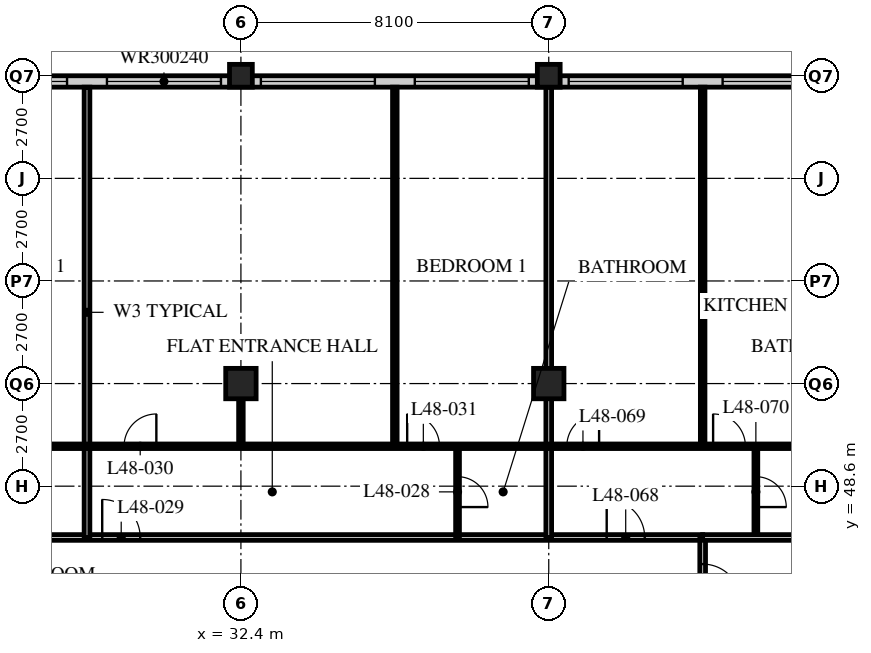
"""IFC4 building model, lengths in metres.
Left out: names, types, materials, properties, quantities, classifications, styles, units other than length and angle.
Written with IfcOpenShell. Run it as: python <this file> out.ifc"""

import sys

from ifc_helpers import new_model, si_unit, direction, frame, frame_2d, origin, origin_2d, place, context, subcontext, project, spatial, rectangle, hollow_rectangle, extrude, element, fill, save


model = new_model("IFC4")
c1 = context("Model", 3, precision=1e-05, world=origin(), true_north=direction((0.0, 1.0)))
c2 = subcontext(c1, "Body", "Model", "MODEL_VIEW")
j1 = project(units=[si_unit("LENGTHUNIT", "METRE"), si_unit("PLANEANGLEUNIT", "RADIAN")], contexts=[c1])
p1 = place(None, origin())
s1 = spatial("IfcSite", under=j1, at=p1, CompositionType="ELEMENT")
p2 = place(p1, origin())
s2 = spatial("IfcBuilding", under=s1, at=p2, CompositionType="ELEMENT")
p3 = place(p2, frame((0.0, 0.0, 188.4)))
s3 = spatial("IfcBuildingStorey", under=s2, at=p3, CompositionType="ELEMENT", Elevation=188.4)
p4 = place(p3, frame((32.4, 51.3, 0.0), z_axis=(0.0, 0.0, 1.0), x_axis=(1.0, 0.0, 0.0)))
e1 = element("IfcColumn", 1, at=p4, inside=s3, PredefinedType="COLUMN", context=c2, shape_type="SweptSolid", body=[
    extrude(hollow_rectangle(XDim=0.8, YDim=0.8, WallThickness=0.08, at=origin_2d()), origin(), (0.0, 0.0, 1.0), 3.6),
])
p5 = place(p3, frame((32.4, 59.4, 0.0), z_axis=(0.0, 0.0, 1.0), x_axis=(1.0, 0.0, 0.0)))
e2 = element("IfcColumn", 2, at=p5, inside=s3, PredefinedType="COLUMN", context=c2, shape_type="SweptSolid", body=[
    extrude(hollow_rectangle(XDim=0.6, YDim=0.6, WallThickness=0.05, at=origin_2d()), origin(), (0.0, 0.0, 1.0), 3.6),
])
p6 = place(p3, frame((40.5, 51.3, 0.0), z_axis=(0.0, 0.0, 1.0), x_axis=(1.0, 0.0, 0.0)))
e3 = element("IfcColumn", 3, at=p6, inside=s3, PredefinedType="COLUMN", context=c2, shape_type="SweptSolid", body=[
    extrude(hollow_rectangle(XDim=0.8, YDim=0.8, WallThickness=0.08, at=origin_2d()), origin(), (0.0, 0.0, 1.0), 3.6),
])
p7 = place(p3, frame((40.5, 59.4, 0.0), z_axis=(0.0, 0.0, 1.0), x_axis=(1.0, 0.0, 0.0)))
e4 = element("IfcColumn", 4, at=p7, inside=s3, PredefinedType="COLUMN", context=c2, shape_type="SweptSolid", body=[
    extrude(hollow_rectangle(XDim=0.6, YDim=0.6, WallThickness=0.05, at=origin_2d()), origin(), (0.0, 0.0, 1.0), 3.6),
])
p8 = place(p3, frame((48.3, 59.25, 0.0), z_axis=(0.0, 0.0, 1.0), x_axis=(-1.0, 0.0, 0.0)))
e5 = element("IfcWall", 5, at=p8, inside=s3, PredefinedType="SOLIDWALL", context=c2, shape_type="SweptSolid", body=[
    extrude(rectangle(XDim=40.2, YDim=0.3, at=frame_2d((20.1, 0.0))), origin(), (0.0, 0.0, 1.0), 3.39),
])
p9 = place(p8, frame((0.225, 0.0, 0.6)))
e6 = element("IfcOpeningElement", 6, at=p9, cuts=e5, PredefinedType="OPENING", context=c2, shape_type="SweptSolid", body=[
    extrude(rectangle(XDim=3.0, YDim=2.4, at=frame_2d((1.5, 1.2))), frame((0.0, 0.16, 0.0), z_axis=(0.0, -1.0, 0.0), x_axis=(1.0, 0.0, 0.0)), (0.0, 0.0, 1.0), 0.32),
])
p10 = place(p8, frame((4.275, 0.0, 0.6)))
e7 = element("IfcOpeningElement", 7, at=p10, cuts=e5, PredefinedType="OPENING", context=c2, shape_type="SweptSolid", body=[
    extrude(rectangle(XDim=3.0, YDim=2.4, at=frame_2d((1.5, 1.2))), frame((0.0, 0.16, 0.0), z_axis=(0.0, -1.0, 0.0), x_axis=(1.0, 0.0, 0.0)), (0.0, 0.0, 1.0), 0.32),
])
p11 = place(p8, frame((8.325, 0.0, 0.6)))
e8 = element("IfcOpeningElement", 8, at=p11, cuts=e5, PredefinedType="OPENING", context=c2, shape_type="SweptSolid", body=[
    extrude(rectangle(XDim=3.0, YDim=2.4, at=frame_2d((1.5, 1.2))), frame((0.0, 0.16, 0.0), z_axis=(0.0, -1.0, 0.0), x_axis=(1.0, 0.0, 0.0)), (0.0, 0.0, 1.0), 0.32),
])
p12 = place(p8, frame((12.375, 0.0, 0.6)))
e9 = element("IfcOpeningElement", 9, at=p12, cuts=e5, PredefinedType="OPENING", context=c2, shape_type="SweptSolid", body=[
    extrude(rectangle(XDim=3.0, YDim=2.4, at=frame_2d((1.5, 1.2))), frame((0.0, 0.16, 0.0), z_axis=(0.0, -1.0, 0.0), x_axis=(1.0, 0.0, 0.0)), (0.0, 0.0, 1.0), 0.32),
])
p13 = place(p8, frame((16.425, 0.0, 0.6)))
e10 = element("IfcOpeningElement", 10, at=p13, cuts=e5, PredefinedType="OPENING", context=c2, shape_type="SweptSolid", body=[
    extrude(rectangle(XDim=3.0, YDim=2.4, at=frame_2d((1.5, 1.2))), frame((0.0, 0.16, 0.0), z_axis=(0.0, -1.0, 0.0), x_axis=(1.0, 0.0, 0.0)), (0.0, 0.0, 1.0), 0.32),
])
p14 = place(p8, frame((20.475, 0.0, 0.6)))
e11 = element("IfcOpeningElement", 11, at=p14, cuts=e5, PredefinedType="OPENING", context=c2, shape_type="SweptSolid", body=[
    extrude(rectangle(XDim=3.0, YDim=2.4, at=frame_2d((1.5, 1.2))), frame((0.0, 0.16, 0.0), z_axis=(0.0, -1.0, 0.0), x_axis=(1.0, 0.0, 0.0)), (0.0, 0.0, 1.0), 0.32),
])
p15 = place(p8, frame((24.525, 0.0, 0.6)))
e12 = element("IfcOpeningElement", 12, at=p15, cuts=e5, PredefinedType="OPENING", context=c2, shape_type="SweptSolid", body=[
    extrude(rectangle(XDim=3.0, YDim=2.4, at=frame_2d((1.5, 1.2))), frame((0.0, 0.16, 0.0), z_axis=(0.0, -1.0, 0.0), x_axis=(1.0, 0.0, 0.0)), (0.0, 0.0, 1.0), 0.32),
])
p16 = place(p8, frame((28.575, 0.0, 0.6)))
e13 = element("IfcOpeningElement", 13, at=p16, cuts=e5, PredefinedType="OPENING", context=c2, shape_type="SweptSolid", body=[
    extrude(rectangle(XDim=3.0, YDim=2.4, at=frame_2d((1.5, 1.2))), frame((0.0, 0.16, 0.0), z_axis=(0.0, -1.0, 0.0), x_axis=(1.0, 0.0, 0.0)), (0.0, 0.0, 1.0), 0.32),
])
p17 = place(p8, frame((32.625, 0.0, 0.6)))
e14 = element("IfcOpeningElement", 14, at=p17, cuts=e5, PredefinedType="OPENING", context=c2, shape_type="SweptSolid", body=[
    extrude(rectangle(XDim=3.0, YDim=2.4, at=frame_2d((1.5, 1.2))), frame((0.0, 0.16, 0.0), z_axis=(0.0, -1.0, 0.0), x_axis=(1.0, 0.0, 0.0)), (0.0, 0.0, 1.0), 0.32),
])
p18 = place(p8, frame((36.675, 0.0, 0.6)))
e15 = element("IfcOpeningElement", 15, at=p18, cuts=e5, PredefinedType="OPENING", context=c2, shape_type="SweptSolid", body=[
    extrude(rectangle(XDim=3.0, YDim=2.4, at=frame_2d((1.5, 1.2))), frame((0.0, 0.16, 0.0), z_axis=(0.0, -1.0, 0.0), x_axis=(1.0, 0.0, 0.0)), (0.0, 0.0, 1.0), 0.32),
])
p19 = place(p3, frame((12.15, 47.25, 0.0), z_axis=(0.0, 0.0, 1.0), x_axis=(1.0, 0.0, 0.0)))
e16 = element("IfcWall", 16, at=p19, inside=s3, PredefinedType="PARTITIONING", context=c2, shape_type="SweptSolid", body=[
    extrude(rectangle(XDim=32.4, YDim=0.15, at=frame_2d((16.2, 0.0))), origin(), (0.0, 0.0, 1.0), 3.39),
])
p20 = place(p19, frame((4.45, 0.0, 0.0)))
e17 = element("IfcOpeningElement", 17, at=p20, cuts=e16, PredefinedType="OPENING", context=c2, shape_type="SweptSolid", body=[
    extrude(rectangle(XDim=1.0, YDim=2.1, at=frame_2d((0.5, 1.05))), frame((0.0, 0.085, 0.0), z_axis=(0.0, -1.0, 0.0), x_axis=(1.0, 0.0, 0.0)), (0.0, 0.0, 1.0), 0.17),
])
p21 = place(p19, frame((16.6, 0.0, 0.0)))
e18 = element("IfcOpeningElement", 18, at=p21, cuts=e16, PredefinedType="OPENING", context=c2, shape_type="SweptSolid", body=[
    extrude(rectangle(XDim=1.0, YDim=2.1, at=frame_2d((0.5, 1.05))), frame((0.0, 0.085, 0.0), z_axis=(0.0, -1.0, 0.0), x_axis=(1.0, 0.0, 0.0)), (0.0, 0.0, 1.0), 0.17),
])
p22 = place(p19, frame((29.875, 0.0, 0.0)))
e19 = element("IfcOpeningElement", 19, at=p22, cuts=e16, PredefinedType="OPENING", context=c2, shape_type="SweptSolid", body=[
    extrude(rectangle(XDim=1.0, YDim=2.1, at=frame_2d((0.5, 1.05))), frame((0.0, 0.085, 0.0), z_axis=(0.0, -1.0, 0.0), x_axis=(1.0, 0.0, 0.0)), (0.0, 0.0, 1.0), 0.17),
])
p23 = place(p19, frame((1.525, 0.0, 0.0)))
e20 = element("IfcOpeningElement", 20, at=p23, cuts=e16, PredefinedType="OPENING", context=c2, shape_type="SweptSolid", body=[
    extrude(rectangle(XDim=1.0, YDim=2.1, at=frame_2d((0.5, 1.05))), frame((0.0, 0.085, 0.0), z_axis=(0.0, -1.0, 0.0), x_axis=(1.0, 0.0, 0.0)), (0.0, 0.0, 1.0), 0.17),
])
p24 = place(p3, frame((44.55, 18.9, 0.0), z_axis=(0.0, 0.0, 1.0), x_axis=(0.0, 1.0, 0.0)))
e21 = element("IfcWall", 21, at=p24, inside=s3, PredefinedType="PARTITIONING", context=c2, shape_type="SweptSolid", body=[
    extrude(rectangle(XDim=28.35, YDim=0.15, at=frame_2d((14.175, 0.0))), origin(), (0.0, 0.0, 1.0), 3.39),
])
p25 = place(p24, frame((0.4, 0.0, 0.0)))
e22 = element("IfcOpeningElement", 22, at=p25, cuts=e21, PredefinedType="OPENING", context=c2, shape_type="SweptSolid", body=[
    extrude(rectangle(XDim=1.0, YDim=2.1, at=frame_2d((0.5, 1.05))), frame((0.0, 0.085, 0.0), z_axis=(0.0, -1.0, 0.0), x_axis=(1.0, 0.0, 0.0)), (0.0, 0.0, 1.0), 0.17),
])
p26 = place(p24, frame((10.45, 0.0, 0.0)))
e23 = element("IfcOpeningElement", 23, at=p26, cuts=e21, PredefinedType="OPENING", context=c2, shape_type="SweptSolid", body=[
    extrude(rectangle(XDim=1.0, YDim=2.1, at=frame_2d((0.5, 1.05))), frame((0.0, 0.085, 0.0), z_axis=(0.0, -1.0, 0.0), x_axis=(1.0, 0.0, 0.0)), (0.0, 0.0, 1.0), 0.17),
])
p27 = place(p24, frame((14.5, 0.0, 0.0)))
e24 = element("IfcOpeningElement", 24, at=p27, cuts=e21, PredefinedType="OPENING", context=c2, shape_type="SweptSolid", body=[
    extrude(rectangle(XDim=1.0, YDim=2.1, at=frame_2d((0.5, 1.05))), frame((0.0, 0.085, 0.0), z_axis=(0.0, -1.0, 0.0), x_axis=(1.0, 0.0, 0.0)), (0.0, 0.0, 1.0), 0.17),
])
p28 = place(p24, frame((16.6, 0.0, 0.0)))
e25 = element("IfcOpeningElement", 25, at=p28, cuts=e21, PredefinedType="OPENING", context=c2, shape_type="SweptSolid", body=[
    extrude(rectangle(XDim=1.0, YDim=2.1, at=frame_2d((0.5, 1.05))), frame((0.0, 0.085, 0.0), z_axis=(0.0, -1.0, 0.0), x_axis=(1.0, 0.0, 0.0)), (0.0, 0.0, 1.0), 0.17),
])
p29 = place(p24, frame((26.65, 0.0, 0.0)))
e26 = element("IfcOpeningElement", 26, at=p29, cuts=e21, PredefinedType="OPENING", context=c2, shape_type="SweptSolid", body=[
    extrude(rectangle(XDim=1.0, YDim=2.1, at=frame_2d((0.5, 1.05))), frame((0.0, 0.085, 0.0), z_axis=(0.0, -1.0, 0.0), x_axis=(1.0, 0.0, 0.0)), (0.0, 0.0, 1.0), 0.17),
])
p30 = place(p3, frame((28.35, 47.25, 0.0), z_axis=(0.0, 0.0, 1.0), x_axis=(0.0, 1.0, 0.0)))
e27 = element("IfcWall", 27, at=p30, inside=s3, PredefinedType="PARTITIONING", context=c2, shape_type="SweptSolid", body=[
    extrude(rectangle(XDim=11.85, YDim=0.15, at=frame_2d((5.925, 0.0))), origin(), (0.0, 0.0, 1.0), 3.39),
])
p31 = place(p3, frame((38.1, 47.25, 0.0), z_axis=(0.0, 0.0, 1.0), x_axis=(0.0, 1.0, 0.0)))
e28 = element("IfcWall", 28, at=p31, inside=s3, PredefinedType="PARTITIONING", context=c2, shape_type="SweptSolid", body=[
    extrude(rectangle(XDim=2.4, YDim=0.1, at=frame_2d((1.2, 0.0))), origin(), (0.0, 0.0, 1.0), 3.39),
])
p32 = place(p31, frame((0.8, 0.0, 0.0)))
e29 = element("IfcOpeningElement", 29, at=p32, cuts=e28, PredefinedType="OPENING", context=c2, shape_type="SweptSolid", body=[
    extrude(rectangle(XDim=0.8, YDim=2.1, at=frame_2d((0.4, 1.05))), frame((0.0, 0.06, 0.0), z_axis=(0.0, -1.0, 0.0), x_axis=(1.0, 0.0, 0.0)), (0.0, 0.0, 1.0), 0.12),
])
p33 = place(p3, frame((36.45, 49.65, 0.0), z_axis=(0.0, 0.0, 1.0), x_axis=(0.0, 1.0, 0.0)))
e30 = element("IfcWall", 30, at=p33, inside=s3, PredefinedType="PARTITIONING", context=c2, shape_type="SweptSolid", body=[
    extrude(rectangle(XDim=9.45, YDim=0.12, at=frame_2d((4.725, 0.0))), origin(), (0.0, 0.0, 1.0), 3.39),
])
p34 = place(p3, frame((45.95, 47.25, 0.0), z_axis=(0.0, 0.0, 1.0), x_axis=(0.0, 1.0, 0.0)))
e31 = element("IfcWall", 31, at=p34, inside=s3, PredefinedType="PARTITIONING", context=c2, shape_type="SweptSolid", body=[
    extrude(rectangle(XDim=2.4, YDim=0.1, at=frame_2d((1.2, 0.0))), origin(), (0.0, 0.0, 1.0), 3.39),
])
p35 = place(p34, frame((0.8, 0.0, 0.0)))
e32 = element("IfcOpeningElement", 32, at=p35, cuts=e31, PredefinedType="OPENING", context=c2, shape_type="SweptSolid", body=[
    extrude(rectangle(XDim=0.8, YDim=2.1, at=frame_2d((0.4, 1.05))), frame((0.0, 0.06, 0.0), z_axis=(0.0, -1.0, 0.0), x_axis=(1.0, 0.0, 0.0)), (0.0, 0.0, 1.0), 0.12),
])
p36 = place(p3, frame((44.55, 49.65, 0.0), z_axis=(0.0, 0.0, 1.0), x_axis=(0.0, 1.0, 0.0)))
e33 = element("IfcWall", 33, at=p36, inside=s3, PredefinedType="PARTITIONING", context=c2, shape_type="SweptSolid", body=[
    extrude(rectangle(XDim=9.45, YDim=0.12, at=frame_2d((4.725, 0.0))), origin(), (0.0, 0.0, 1.0), 3.39),
])
p37 = place(p3, frame((44.55, 47.25, 0.0), z_axis=(0.0, 0.0, 1.0), x_axis=(1.0, 0.0, 0.0)))
e34 = element("IfcWall", 34, at=p37, inside=s3, PredefinedType="PARTITIONING", context=c2, shape_type="SweptSolid", body=[
    extrude(rectangle(XDim=11.85, YDim=0.15, at=frame_2d((5.925, 0.0))), origin(), (0.0, 0.0, 1.0), 3.39),
])
p38 = place(p3, frame((40.5, 47.25, 0.0), z_axis=(0.0, 0.0, 1.0), x_axis=(0.0, 1.0, 0.0)))
e35 = element("IfcWall", 35, at=p38, inside=s3, PredefinedType="PARTITIONING", context=c2, shape_type="SweptSolid", body=[
    extrude(rectangle(XDim=11.85, YDim=0.15, at=frame_2d((5.925, 0.0))), origin(), (0.0, 0.0, 1.0), 2.778),
])
p39 = place(p3, frame((8.15, 49.65, 0.0), z_axis=(0.0, 0.0, 1.0), x_axis=(1.0, 0.0, 0.0)))
e36 = element("IfcWall", 36, at=p39, inside=s3, PredefinedType="PARTITIONING", context=c2, shape_type="SweptSolid", body=[
    extrude(rectangle(XDim=40.4, YDim=0.12, at=frame_2d((20.2, 0.0))), origin(), (0.0, 0.0, 1.0), 3.39),
])
p40 = place(p39, frame((9.025, 0.0, 0.0)))
e37 = element("IfcOpeningElement", 37, at=p40, cuts=e36, PredefinedType="OPENING", context=c2, shape_type="SweptSolid", body=[
    extrude(rectangle(XDim=0.85, YDim=2.1, at=frame_2d((0.425, 1.05))), frame((0.0, 0.07, 0.0), z_axis=(0.0, -1.0, 0.0), x_axis=(1.0, 0.0, 0.0)), (0.0, 0.0, 1.0), 0.14),
])
p41 = place(p39, frame((16.475, 0.0, 0.0)))
e38 = element("IfcOpeningElement", 38, at=p41, cuts=e36, PredefinedType="OPENING", context=c2, shape_type="SweptSolid", body=[
    extrude(rectangle(XDim=0.85, YDim=2.1, at=frame_2d((0.425, 1.05))), frame((0.0, 0.07, 0.0), z_axis=(0.0, -1.0, 0.0), x_axis=(1.0, 0.0, 0.0)), (0.0, 0.0, 1.0), 0.14),
])
p42 = place(p39, frame((21.175, 0.0, 0.0)))
e39 = element("IfcOpeningElement", 39, at=p42, cuts=e36, PredefinedType="OPENING", context=c2, shape_type="SweptSolid", body=[
    extrude(rectangle(XDim=0.85, YDim=2.1, at=frame_2d((0.425, 1.05))), frame((0.0, 0.07, 0.0), z_axis=(0.0, -1.0, 0.0), x_axis=(1.0, 0.0, 0.0)), (0.0, 0.0, 1.0), 0.14),
])
p43 = place(p39, frame((28.625, 0.0, 0.0)))
e40 = element("IfcOpeningElement", 40, at=p43, cuts=e36, PredefinedType="OPENING", context=c2, shape_type="SweptSolid", body=[
    extrude(rectangle(XDim=0.85, YDim=2.1, at=frame_2d((0.425, 1.05))), frame((0.0, 0.07, 0.0), z_axis=(0.0, -1.0, 0.0), x_axis=(1.0, 0.0, 0.0)), (0.0, 0.0, 1.0), 0.14),
])
p44 = place(p39, frame((32.825, 0.0, 0.0)))
e41 = element("IfcOpeningElement", 41, at=p44, cuts=e36, PredefinedType="OPENING", context=c2, shape_type="SweptSolid", body=[
    extrude(rectangle(XDim=0.85, YDim=2.1, at=frame_2d((0.425, 1.05))), frame((0.0, 0.07, 0.0), z_axis=(0.0, -1.0, 0.0), x_axis=(1.0, 0.0, 0.0)), (0.0, 0.0, 1.0), 0.14),
])
p45 = place(p39, frame((36.675, 0.0, 0.0)))
e42 = element("IfcOpeningElement", 42, at=p45, cuts=e36, PredefinedType="OPENING", context=c2, shape_type="SweptSolid", body=[
    extrude(rectangle(XDim=0.85, YDim=2.1, at=frame_2d((0.425, 1.05))), frame((0.0, 0.07, 0.0), z_axis=(0.0, -1.0, 0.0), x_axis=(1.0, 0.0, 0.0)), (0.0, 0.0, 1.0), 0.14),
])
p46 = place(p39, frame((6.725, 0.0, 0.0)))
e43 = element("IfcOpeningElement", 43, at=p46, cuts=e36, PredefinedType="OPENING", context=c2, shape_type="SweptSolid", body=[
    extrude(rectangle(XDim=0.85, YDim=2.1, at=frame_2d((0.425, 1.05))), frame((0.0, 0.07, 0.0), z_axis=(0.0, -1.0, 0.0), x_axis=(1.0, 0.0, 0.0)), (0.0, 0.0, 1.0), 0.14),
])
p47 = place(p39, frame((2.875, 0.0, 0.0)))
e44 = element("IfcOpeningElement", 44, at=p47, cuts=e36, PredefinedType="OPENING", context=c2, shape_type="SweptSolid", body=[
    extrude(rectangle(XDim=0.85, YDim=2.1, at=frame_2d((0.425, 1.05))), frame((0.0, 0.07, 0.0), z_axis=(0.0, -1.0, 0.0), x_axis=(1.0, 0.0, 0.0)), (0.0, 0.0, 1.0), 0.14),
])
p48 = place(p3, frame((32.4, 49.65, 0.0), z_axis=(0.0, 0.0, 1.0), x_axis=(0.0, 1.0, 0.0)))
e45 = element("IfcWall", 45, at=p48, inside=s3, PredefinedType="PARTITIONING", context=c2, shape_type="SweptSolid", body=[
    extrude(rectangle(XDim=1.25, YDim=0.12, at=frame_2d((0.625, 0.0))), origin(), (0.0, 0.0, 1.0), 2.778),
])
p49 = place(p9, origin())
e46 = element("IfcWindow", 46, at=p49, inside=s3, PartitioningType="SINGLE_PANEL", PredefinedType="WINDOW", context=c2, shape_type="SweptSolid", body=[
    extrude(rectangle(XDim=3.0, YDim=2.4, at=frame_2d((1.5, 1.2))), frame((0.0, 0.03, 0.0), z_axis=(0.0, -1.0, 0.0), x_axis=(1.0, 0.0, 0.0)), (0.0, 0.0, 1.0), 0.06),
])
fill(e6, e46)
p50 = place(p10, origin())
e47 = element("IfcWindow", 47, at=p50, inside=s3, PartitioningType="SINGLE_PANEL", PredefinedType="WINDOW", context=c2, shape_type="SweptSolid", body=[
    extrude(rectangle(XDim=3.0, YDim=2.4, at=frame_2d((1.5, 1.2))), frame((0.0, 0.03, 0.0), z_axis=(0.0, -1.0, 0.0), x_axis=(1.0, 0.0, 0.0)), (0.0, 0.0, 1.0), 0.06),
])
fill(e7, e47)
p51 = place(p11, origin())
e48 = element("IfcWindow", 48, at=p51, inside=s3, PartitioningType="SINGLE_PANEL", PredefinedType="WINDOW", context=c2, shape_type="SweptSolid", body=[
    extrude(rectangle(XDim=3.0, YDim=2.4, at=frame_2d((1.5, 1.2))), frame((0.0, 0.03, 0.0), z_axis=(0.0, -1.0, 0.0), x_axis=(1.0, 0.0, 0.0)), (0.0, 0.0, 1.0), 0.06),
])
fill(e8, e48)
p52 = place(p12, origin())
e49 = element("IfcWindow", 49, at=p52, inside=s3, PartitioningType="SINGLE_PANEL", PredefinedType="WINDOW", context=c2, shape_type="SweptSolid", body=[
    extrude(rectangle(XDim=3.0, YDim=2.4, at=frame_2d((1.5, 1.2))), frame((0.0, 0.03, 0.0), z_axis=(0.0, -1.0, 0.0), x_axis=(1.0, 0.0, 0.0)), (0.0, 0.0, 1.0), 0.06),
])
fill(e9, e49)
p53 = place(p13, origin())
e50 = element("IfcWindow", 50, at=p53, inside=s3, PartitioningType="SINGLE_PANEL", PredefinedType="WINDOW", context=c2, shape_type="SweptSolid", body=[
    extrude(rectangle(XDim=3.0, YDim=2.4, at=frame_2d((1.5, 1.2))), frame((0.0, 0.03, 0.0), z_axis=(0.0, -1.0, 0.0), x_axis=(1.0, 0.0, 0.0)), (0.0, 0.0, 1.0), 0.06),
])
fill(e10, e50)
p54 = place(p14, origin())
e51 = element("IfcWindow", 51, at=p54, inside=s3, PartitioningType="SINGLE_PANEL", PredefinedType="WINDOW", context=c2, shape_type="SweptSolid", body=[
    extrude(rectangle(XDim=3.0, YDim=2.4, at=frame_2d((1.5, 1.2))), frame((0.0, 0.03, 0.0), z_axis=(0.0, -1.0, 0.0), x_axis=(1.0, 0.0, 0.0)), (0.0, 0.0, 1.0), 0.06),
])
fill(e11, e51)
p55 = place(p32, origin())
e52 = element("IfcDoor", 52, at=p55, inside=s3, OperationType="SINGLE_SWING_RIGHT", PredefinedType="DOOR", context=c2, shape_type="SweptSolid", body=[
    extrude(rectangle(XDim=0.8, YDim=2.1, at=frame_2d((0.4, 1.05))), frame((0.0, 0.025, 0.0), z_axis=(0.0, -1.0, 0.0), x_axis=(1.0, 0.0, 0.0)), (0.0, 0.0, 1.0), 0.05),
])
fill(e29, e52)
p56 = place(p21, origin())
e53 = element("IfcDoor", 53, at=p56, inside=s3, OperationType="SINGLE_SWING_LEFT", PredefinedType="DOOR", context=c2, shape_type="SweptSolid", body=[
    extrude(rectangle(XDim=1.0, YDim=2.1, at=frame_2d((0.5, 1.05))), frame((0.0, 0.025, 0.0), z_axis=(0.0, -1.0, 0.0), x_axis=(1.0, 0.0, 0.0)), (0.0, 0.0, 1.0), 0.05),
])
fill(e18, e53)
p57 = place(p42, origin())
e54 = element("IfcDoor", 54, at=p57, inside=s3, OperationType="SINGLE_SWING_RIGHT", PredefinedType="DOOR", context=c2, shape_type="SweptSolid", body=[
    extrude(rectangle(XDim=0.85, YDim=2.1, at=frame_2d((0.425, 1.05))), frame((0.0, 0.025, 0.0), z_axis=(0.0, -1.0, 0.0), x_axis=(1.0, 0.0, 0.0)), (0.0, 0.0, 1.0), 0.05),
])
fill(e39, e54)
p58 = place(p43, origin())
e55 = element("IfcDoor", 55, at=p58, inside=s3, OperationType="SINGLE_SWING_LEFT", PredefinedType="DOOR", context=c2, shape_type="SweptSolid", body=[
    extrude(rectangle(XDim=0.85, YDim=2.1, at=frame_2d((0.425, 1.05))), frame((0.0, 0.025, 0.0), z_axis=(0.0, -1.0, 0.0), x_axis=(1.0, 0.0, 0.0)), (0.0, 0.0, 1.0), 0.05),
])
fill(e40, e55)
p59 = place(p29, origin())
e56 = element("IfcDoor", 56, at=p59, inside=s3, OperationType="SINGLE_SWING_RIGHT", PredefinedType="DOOR", context=c2, shape_type="SweptSolid", body=[
    extrude(rectangle(XDim=1.0, YDim=2.1, at=frame_2d((0.5, 1.05))), frame((0.0, 0.025, 0.0), z_axis=(0.0, -1.0, 0.0), x_axis=(1.0, 0.0, 0.0)), (0.0, 0.0, 1.0), 0.05),
])
fill(e26, e56)
p60 = place(p22, origin())
e57 = element("IfcDoor", 57, at=p60, inside=s3, OperationType="SINGLE_SWING_LEFT", PredefinedType="DOOR", context=c2, shape_type="SweptSolid", body=[
    extrude(rectangle(XDim=1.0, YDim=2.1, at=frame_2d((0.5, 1.05))), frame((0.0, 0.025, 0.0), z_axis=(0.0, -1.0, 0.0), x_axis=(1.0, 0.0, 0.0)), (0.0, 0.0, 1.0), 0.05),
])
fill(e19, e57)
p61 = place(p44, origin())
e58 = element("IfcDoor", 58, at=p61, inside=s3, OperationType="SINGLE_SWING_RIGHT", PredefinedType="DOOR", context=c2, shape_type="SweptSolid", body=[
    extrude(rectangle(XDim=0.85, YDim=2.1, at=frame_2d((0.425, 1.05))), frame((0.0, 0.025, 0.0), z_axis=(0.0, -1.0, 0.0), x_axis=(1.0, 0.0, 0.0)), (0.0, 0.0, 1.0), 0.05),
])
fill(e41, e58)
p62 = place(p35, origin())
e59 = element("IfcDoor", 59, at=p62, inside=s3, OperationType="SINGLE_SWING_RIGHT", PredefinedType="DOOR", context=c2, shape_type="SweptSolid", body=[
    extrude(rectangle(XDim=0.8, YDim=2.1, at=frame_2d((0.4, 1.05))), frame((0.0, 0.025, 0.0), z_axis=(0.0, -1.0, 0.0), x_axis=(1.0, 0.0, 0.0)), (0.0, 0.0, 1.0), 0.05),
])
fill(e32, e59)
p63 = place(p45, origin())
e60 = element("IfcDoor", 60, at=p63, inside=s3, OperationType="SINGLE_SWING_LEFT", PredefinedType="DOOR", context=c2, shape_type="SweptSolid", body=[
    extrude(rectangle(XDim=0.85, YDim=2.1, at=frame_2d((0.425, 1.05))), frame((0.0, 0.025, 0.0), z_axis=(0.0, -1.0, 0.0), x_axis=(1.0, 0.0, 0.0)), (0.0, 0.0, 1.0), 0.05),
])
fill(e42, e60)
save(model, sys.argv[1])
